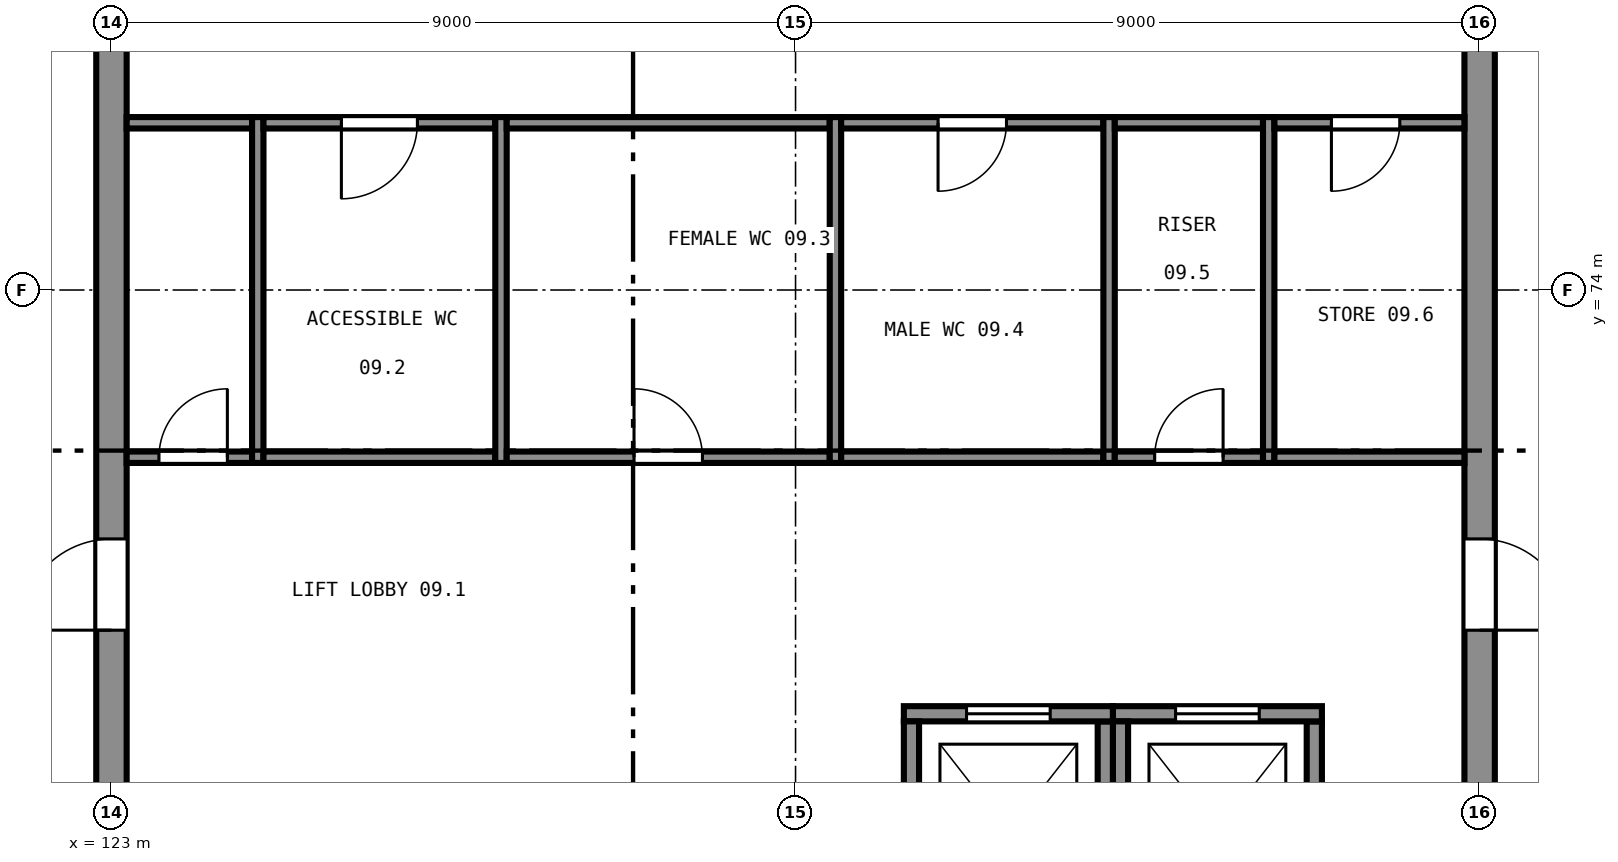
"""IFC4 building model, lengths in metres.
Left out: names, types, materials, properties, quantities, classifications, styles, units other than length and angle.
Written with IfcOpenShell. Run it as: python <this file> out.ifc"""

import sys

from ifc_helpers import new_model, si_unit, direction, frame, frame_2d, origin, place, context, subcontext, project, spatial, rectangle, extrude, element, fill, save


model = new_model("IFC4")
c1 = context("Model", 3, precision=1e-05, world=origin(), true_north=direction((0.0, 1.0)))
c2 = subcontext(c1, "Body", "Model", "MODEL_VIEW")
j1 = project(units=[si_unit("LENGTHUNIT", "METRE"), si_unit("PLANEANGLEUNIT", "RADIAN")], contexts=[c1])
p1 = place(None, origin())
s1 = spatial("IfcSite", under=j1, at=p1, CompositionType="ELEMENT")
p2 = place(p1, origin())
s2 = spatial("IfcBuilding", under=s1, at=p2, CompositionType="ELEMENT")
p3 = place(p2, frame((0.0, 0.0, 37.5)))
s3 = spatial("IfcBuildingStorey", under=s2, at=p3, CompositionType="ELEMENT", Elevation=37.5)
p4 = place(p3, frame((141.0, 65.2, 0.0), z_axis=(0.0, 0.0, 1.0), x_axis=(0.0, 1.0, 0.0)))
e1 = element("IfcWall", 1, at=p4, inside=s3, PredefinedType="SHEAR", context=c2, shape_type="SweptSolid", body=[
    extrude(rectangle(XDim=17.6, YDim=0.4, at=frame_2d((8.8, 0.0))), origin(), (0.0, 0.0, 1.0), 4.0),
])
p5 = place(p4, frame((4.325, 0.0, 0.0)))
e2 = element("IfcOpeningElement", 2, at=p5, cuts=e1, PredefinedType="OPENING", context=c2, shape_type="SweptSolid", body=[
    extrude(rectangle(XDim=1.2, YDim=2.1, at=frame_2d((0.6, 1.05))), frame((0.0, 0.21, 0.0), z_axis=(0.0, -1.0, 0.0), x_axis=(1.0, 0.0, 0.0)), (0.0, 0.0, 1.0), 0.42),
])
p6 = place(p4, frame((12.075, 0.0, 0.0)))
e3 = element("IfcOpeningElement", 3, at=p6, cuts=e1, PredefinedType="OPENING", context=c2, shape_type="SweptSolid", body=[
    extrude(rectangle(XDim=1.2, YDim=2.1, at=frame_2d((0.6, 1.05))), frame((0.0, 0.21, 0.0), z_axis=(0.0, -1.0, 0.0), x_axis=(1.0, 0.0, 0.0)), (0.0, 0.0, 1.0), 0.42),
])
p7 = place(p3, frame((123.0, 82.8, 0.0), z_axis=(0.0, 0.0, 1.0), x_axis=(0.0, -1.0, 0.0)))
e4 = element("IfcWall", 4, at=p7, inside=s3, PredefinedType="SHEAR", context=c2, shape_type="SweptSolid", body=[
    extrude(rectangle(XDim=17.6, YDim=0.4, at=frame_2d((8.8, 0.0))), origin(), (0.0, 0.0, 1.0), 4.0),
])
p8 = place(p7, frame((12.075, 0.0, 0.0)))
e5 = element("IfcOpeningElement", 5, at=p8, cuts=e4, PredefinedType="OPENING", context=c2, shape_type="SweptSolid", body=[
    extrude(rectangle(XDim=1.2, YDim=2.1, at=frame_2d((0.6, 1.05))), frame((0.0, 0.21, 0.0), z_axis=(0.0, -1.0, 0.0), x_axis=(1.0, 0.0, 0.0)), (0.0, 0.0, 1.0), 0.42),
])
p9 = place(p7, frame((4.325, 0.0, 0.0)))
e6 = element("IfcOpeningElement", 6, at=p9, cuts=e4, PredefinedType="OPENING", context=c2, shape_type="SweptSolid", body=[
    extrude(rectangle(XDim=1.2, YDim=2.1, at=frame_2d((0.6, 1.05))), frame((0.0, 0.21, 0.0), z_axis=(0.0, -1.0, 0.0), x_axis=(1.0, 0.0, 0.0)), (0.0, 0.0, 1.0), 0.42),
])
p10 = place(p3, frame((136.075, 65.425, 0.0), z_axis=(0.0, 0.0, 1.0), x_axis=(0.0, 1.0, 0.0)))
e7 = element("IfcWall", 7, at=p10, inside=s3, PredefinedType="SHEAR", context=c2, shape_type="SweptSolid", body=[
    extrude(rectangle(XDim=2.9, YDim=0.2, at=frame_2d((1.45, 0.0))), origin(), (0.0, 0.0, 1.0), 4.0),
])
p11 = place(p3, frame((136.175, 68.425, 0.0), z_axis=(0.0, 0.0, 1.0), x_axis=(-1.0, 0.0, 0.0)))
e8 = element("IfcWall", 8, at=p11, inside=s3, PredefinedType="SHEAR", context=c2, shape_type="SweptSolid", body=[
    extrude(rectangle(XDim=2.75, YDim=0.2, at=frame_2d((1.375, 0.0))), origin(), (0.0, 0.0, 1.0), 4.0),
])
p12 = place(p11, frame((0.825, 0.0, 0.0)))
e9 = element("IfcOpeningElement", 9, at=p12, cuts=e8, PredefinedType="OPENING", context=c2, shape_type="SweptSolid", body=[
    extrude(rectangle(XDim=1.1, YDim=2.1, at=frame_2d((0.55, 1.05))), frame((0.0, 0.11, 0.0), z_axis=(0.0, -1.0, 0.0), x_axis=(1.0, 0.0, 0.0)), (0.0, 0.0, 1.0), 0.22),
])
for number, where, z_axis, x_axis in (
    (10, (133.525, 68.325, 0.0), (0.0, 0.0, 1.0), (0.0, -1.0, 0.0)),
    (11, (138.825, 65.425, 0.0), (0.0, 0.0, 1.0), (0.0, 1.0, 0.0)),
):
    element("IfcWall", number, at=place(p3, frame(where, z_axis=z_axis, x_axis=x_axis)), inside=s3, PredefinedType="SHEAR", context=c2, shape_type="SweptSolid", body=[
        extrude(rectangle(XDim=2.9, YDim=0.2, at=frame_2d((1.45, 0.0))), origin(), (0.0, 0.0, 1.0), 4.0),
    ])
p13 = place(p3, frame((138.925, 68.425, 0.0), z_axis=(0.0, 0.0, 1.0), x_axis=(-1.0, 0.0, 0.0)))
e12 = element("IfcWall", 12, at=p13, inside=s3, PredefinedType="SHEAR", context=c2, shape_type="SweptSolid", body=[
    extrude(rectangle(XDim=2.75, YDim=0.2, at=frame_2d((1.375, 0.0))), origin(), (0.0, 0.0, 1.0), 4.0),
])
p14 = place(p13, frame((0.825, 0.0, 0.0)))
e13 = element("IfcOpeningElement", 13, at=p14, cuts=e12, PredefinedType="OPENING", context=c2, shape_type="SweptSolid", body=[
    extrude(rectangle(XDim=1.1, YDim=2.1, at=frame_2d((0.55, 1.05))), frame((0.0, 0.11, 0.0), z_axis=(0.0, -1.0, 0.0), x_axis=(1.0, 0.0, 0.0)), (0.0, 0.0, 1.0), 0.22),
])
p15 = place(p3, frame((136.275, 68.325, 0.0), z_axis=(0.0, 0.0, 1.0), x_axis=(0.0, -1.0, 0.0)))
e14 = element("IfcWall", 14, at=p15, inside=s3, PredefinedType="SHEAR", context=c2, shape_type="SweptSolid", body=[
    extrude(rectangle(XDim=2.9, YDim=0.2, at=frame_2d((1.45, 0.0))), origin(), (0.0, 0.0, 1.0), 4.0),
])
p16 = place(p3, frame((124.925, 71.725, 0.0), z_axis=(0.0, 0.0, 1.0), x_axis=(0.0, 1.0, 0.0)))
e15 = element("IfcWall", 15, at=p16, inside=s3, PredefinedType="PARTITIONING", context=c2, shape_type="SweptSolid", body=[
    extrude(rectangle(XDim=4.55, YDim=0.15, at=frame_2d((2.275, 0.0))), origin(), (0.0, 0.0, 1.0), 3.58),
])
p17 = place(p3, frame((123.2, 71.8, 0.0), z_axis=(0.0, 0.0, 1.0), x_axis=(1.0, 0.0, 0.0)))
e16 = element("IfcWall", 16, at=p17, inside=s3, PredefinedType="PARTITIONING", context=c2, shape_type="SweptSolid", body=[
    extrude(rectangle(XDim=1.65, YDim=0.15, at=frame_2d((0.825, 0.0))), origin(), (0.0, 0.0, 1.0), 3.58),
])
p18 = place(p17, frame((0.425, 0.0, 0.0)))
e17 = element("IfcOpeningElement", 17, at=p18, cuts=e16, PredefinedType="OPENING", context=c2, shape_type="SweptSolid", body=[
    extrude(rectangle(XDim=0.9, YDim=2.1, at=frame_2d((0.45, 1.05))), frame((0.0, 0.085, 0.0), z_axis=(0.0, -1.0, 0.0), x_axis=(1.0, 0.0, 0.0)), (0.0, 0.0, 1.0), 0.17),
])
p19 = place(p3, frame((123.2, 76.2, 0.0), z_axis=(0.0, 0.0, 1.0), x_axis=(1.0, 0.0, 0.0)))
e18 = element("IfcWall", 18, at=p19, inside=s3, PredefinedType="PARTITIONING", context=c2, shape_type="SweptSolid", body=[
    extrude(rectangle(XDim=1.65, YDim=0.15, at=frame_2d((0.825, 0.0))), origin(), (0.0, 0.0, 1.0), 3.58),
])
p20 = place(p3, frame((128.125, 71.725, 0.0), z_axis=(0.0, 0.0, 1.0), x_axis=(0.0, 1.0, 0.0)))
e19 = element("IfcWall", 19, at=p20, inside=s3, PredefinedType="PARTITIONING", context=c2, shape_type="SweptSolid", body=[
    extrude(rectangle(XDim=4.55, YDim=0.15, at=frame_2d((2.275, 0.0))), origin(), (0.0, 0.0, 1.0), 3.58),
])
p21 = place(p3, frame((125.0, 71.8, 0.0), z_axis=(0.0, 0.0, 1.0), x_axis=(1.0, 0.0, 0.0)))
e20 = element("IfcWall", 20, at=p21, inside=s3, PredefinedType="PARTITIONING", context=c2, shape_type="SweptSolid", body=[
    extrude(rectangle(XDim=3.05, YDim=0.15, at=frame_2d((1.525, 0.0))), origin(), (0.0, 0.0, 1.0), 3.58),
])
p22 = place(p3, frame((125.0, 76.2, 0.0), z_axis=(0.0, 0.0, 1.0), x_axis=(1.0, 0.0, 0.0)))
e21 = element("IfcWall", 21, at=p22, inside=s3, PredefinedType="PARTITIONING", context=c2, shape_type="SweptSolid", body=[
    extrude(rectangle(XDim=3.05, YDim=0.15, at=frame_2d((1.525, 0.0))), origin(), (0.0, 0.0, 1.0), 3.58),
])
p23 = place(p22, frame((1.025, 0.0, 0.0)))
e22 = element("IfcOpeningElement", 22, at=p23, cuts=e21, PredefinedType="OPENING", context=c2, shape_type="SweptSolid", body=[
    extrude(rectangle(XDim=1.0, YDim=2.1, at=frame_2d((0.5, 1.05))), frame((0.0, 0.085, 0.0), z_axis=(0.0, -1.0, 0.0), x_axis=(1.0, 0.0, 0.0)), (0.0, 0.0, 1.0), 0.17),
])
p24 = place(p3, frame((132.525, 71.725, 0.0), z_axis=(0.0, 0.0, 1.0), x_axis=(0.0, 1.0, 0.0)))
e23 = element("IfcWall", 23, at=p24, inside=s3, PredefinedType="PARTITIONING", context=c2, shape_type="SweptSolid", body=[
    extrude(rectangle(XDim=4.55, YDim=0.15, at=frame_2d((2.275, 0.0))), origin(), (0.0, 0.0, 1.0), 3.58),
])
p25 = place(p3, frame((128.2, 71.8, 0.0), z_axis=(0.0, 0.0, 1.0), x_axis=(1.0, 0.0, 0.0)))
e24 = element("IfcWall", 24, at=p25, inside=s3, PredefinedType="PARTITIONING", context=c2, shape_type="SweptSolid", body=[
    extrude(rectangle(XDim=4.25, YDim=0.15, at=frame_2d((2.125, 0.0))), origin(), (0.0, 0.0, 1.0), 3.58),
])
p26 = place(p25, frame((1.675, 0.0, 0.0)))
e25 = element("IfcOpeningElement", 25, at=p26, cuts=e24, PredefinedType="OPENING", context=c2, shape_type="SweptSolid", body=[
    extrude(rectangle(XDim=0.9, YDim=2.1, at=frame_2d((0.45, 1.05))), frame((0.0, 0.085, 0.0), z_axis=(0.0, -1.0, 0.0), x_axis=(1.0, 0.0, 0.0)), (0.0, 0.0, 1.0), 0.17),
])
p27 = place(p3, frame((128.2, 76.2, 0.0), z_axis=(0.0, 0.0, 1.0), x_axis=(1.0, 0.0, 0.0)))
e26 = element("IfcWall", 26, at=p27, inside=s3, PredefinedType="PARTITIONING", context=c2, shape_type="SweptSolid", body=[
    extrude(rectangle(XDim=4.25, YDim=0.15, at=frame_2d((2.125, 0.0))), origin(), (0.0, 0.0, 1.0), 3.58),
])
p28 = place(p3, frame((136.125, 71.725, 0.0), z_axis=(0.0, 0.0, 1.0), x_axis=(0.0, 1.0, 0.0)))
e27 = element("IfcWall", 27, at=p28, inside=s3, PredefinedType="PARTITIONING", context=c2, shape_type="SweptSolid", body=[
    extrude(rectangle(XDim=4.55, YDim=0.15, at=frame_2d((2.275, 0.0))), origin(), (0.0, 0.0, 1.0), 3.58),
])
p29 = place(p3, frame((132.6, 71.8, 0.0), z_axis=(0.0, 0.0, 1.0), x_axis=(1.0, 0.0, 0.0)))
e28 = element("IfcWall", 28, at=p29, inside=s3, PredefinedType="PARTITIONING", context=c2, shape_type="SweptSolid", body=[
    extrude(rectangle(XDim=3.45, YDim=0.15, at=frame_2d((1.725, 0.0))), origin(), (0.0, 0.0, 1.0), 3.58),
])
p30 = place(p3, frame((132.6, 76.2, 0.0), z_axis=(0.0, 0.0, 1.0), x_axis=(1.0, 0.0, 0.0)))
e29 = element("IfcWall", 29, at=p30, inside=s3, PredefinedType="PARTITIONING", context=c2, shape_type="SweptSolid", body=[
    extrude(rectangle(XDim=3.45, YDim=0.15, at=frame_2d((1.725, 0.0))), origin(), (0.0, 0.0, 1.0), 3.58),
])
p31 = place(p30, frame((1.275, 0.0, 0.0)))
e30 = element("IfcOpeningElement", 30, at=p31, cuts=e29, PredefinedType="OPENING", context=c2, shape_type="SweptSolid", body=[
    extrude(rectangle(XDim=0.9, YDim=2.1, at=frame_2d((0.45, 1.05))), frame((0.0, 0.085, 0.0), z_axis=(0.0, -1.0, 0.0), x_axis=(1.0, 0.0, 0.0)), (0.0, 0.0, 1.0), 0.17),
])
p32 = place(p3, frame((138.225, 71.725, 0.0), z_axis=(0.0, 0.0, 1.0), x_axis=(0.0, 1.0, 0.0)))
e31 = element("IfcWall", 31, at=p32, inside=s3, PredefinedType="PARTITIONING", context=c2, shape_type="SweptSolid", body=[
    extrude(rectangle(XDim=4.55, YDim=0.15, at=frame_2d((2.275, 0.0))), origin(), (0.0, 0.0, 1.0), 3.58),
])
p33 = place(p3, frame((136.2, 71.8, 0.0), z_axis=(0.0, 0.0, 1.0), x_axis=(1.0, 0.0, 0.0)))
e32 = element("IfcWall", 32, at=p33, inside=s3, PredefinedType="PARTITIONING", context=c2, shape_type="SweptSolid", body=[
    extrude(rectangle(XDim=1.95, YDim=0.15, at=frame_2d((0.975, 0.0))), origin(), (0.0, 0.0, 1.0), 3.58),
])
p34 = place(p33, frame((0.525, 0.0, 0.0)))
e33 = element("IfcOpeningElement", 33, at=p34, cuts=e32, PredefinedType="OPENING", context=c2, shape_type="SweptSolid", body=[
    extrude(rectangle(XDim=0.9, YDim=2.1, at=frame_2d((0.45, 1.05))), frame((0.0, 0.085, 0.0), z_axis=(0.0, -1.0, 0.0), x_axis=(1.0, 0.0, 0.0)), (0.0, 0.0, 1.0), 0.17),
])
p35 = place(p3, frame((136.2, 76.2, 0.0), z_axis=(0.0, 0.0, 1.0), x_axis=(1.0, 0.0, 0.0)))
e34 = element("IfcWall", 34, at=p35, inside=s3, PredefinedType="PARTITIONING", context=c2, shape_type="SweptSolid", body=[
    extrude(rectangle(XDim=1.95, YDim=0.15, at=frame_2d((0.975, 0.0))), origin(), (0.0, 0.0, 1.0), 3.58),
])
p36 = place(p3, frame((138.3, 71.8, 0.0), z_axis=(0.0, 0.0, 1.0), x_axis=(1.0, 0.0, 0.0)))
e35 = element("IfcWall", 35, at=p36, inside=s3, PredefinedType="PARTITIONING", context=c2, shape_type="SweptSolid", body=[
    extrude(rectangle(XDim=2.5, YDim=0.15, at=frame_2d((1.25, 0.0))), origin(), (0.0, 0.0, 1.0), 3.58),
])
p37 = place(p3, frame((138.3, 76.2, 0.0), z_axis=(0.0, 0.0, 1.0), x_axis=(1.0, 0.0, 0.0)))
e36 = element("IfcWall", 36, at=p37, inside=s3, PredefinedType="PARTITIONING", context=c2, shape_type="SweptSolid", body=[
    extrude(rectangle(XDim=2.5, YDim=0.15, at=frame_2d((1.25, 0.0))), origin(), (0.0, 0.0, 1.0), 3.58),
])
p38 = place(p37, frame((0.75, 0.0, 0.0)))
e37 = element("IfcOpeningElement", 37, at=p38, cuts=e36, PredefinedType="OPENING", context=c2, shape_type="SweptSolid", body=[
    extrude(rectangle(XDim=0.9, YDim=2.1, at=frame_2d((0.45, 1.05))), frame((0.0, 0.085, 0.0), z_axis=(0.0, -1.0, 0.0), x_axis=(1.0, 0.0, 0.0)), (0.0, 0.0, 1.0), 0.17),
])
p39 = place(p12, origin())
e38 = element("IfcDoor", 38, at=p39, inside=s3, OperationType="SLIDING_TO_LEFT", PredefinedType="DOOR", context=c2, shape_type="SweptSolid", body=[
    extrude(rectangle(XDim=1.1, YDim=2.1, at=frame_2d((0.55, 1.05))), frame((0.0, 0.025, 0.0), z_axis=(0.0, -1.0, 0.0), x_axis=(1.0, 0.0, 0.0)), (0.0, 0.0, 1.0), 0.05),
])
fill(e9, e38)
p40 = place(p14, origin())
e39 = element("IfcDoor", 39, at=p40, inside=s3, OperationType="SLIDING_TO_LEFT", PredefinedType="DOOR", context=c2, shape_type="SweptSolid", body=[
    extrude(rectangle(XDim=1.1, YDim=2.1, at=frame_2d((0.55, 1.05))), frame((0.0, 0.025, 0.0), z_axis=(0.0, -1.0, 0.0), x_axis=(1.0, 0.0, 0.0)), (0.0, 0.0, 1.0), 0.05),
])
fill(e13, e39)
p41 = place(p8, frame((1.2, 0.0, 0.0), z_axis=(0.0, 0.0, 1.0), x_axis=(-1.0, 0.0, 0.0)))
e40 = element("IfcDoor", 40, at=p41, inside=s3, OperationType="SINGLE_SWING_RIGHT", PredefinedType="DOOR", context=c2, shape_type="SweptSolid", body=[
    extrude(rectangle(XDim=1.2, YDim=2.1, at=frame_2d((0.6, 1.05))), frame((0.0, 0.025, 0.0), z_axis=(0.0, -1.0, 0.0), x_axis=(1.0, 0.0, 0.0)), (0.0, 0.0, 1.0), 0.05),
])
fill(e5, e40)
p42 = place(p5, frame((1.2, 0.0, 0.0), z_axis=(0.0, 0.0, 1.0), x_axis=(-1.0, 0.0, 0.0)))
e41 = element("IfcDoor", 41, at=p42, inside=s3, OperationType="SINGLE_SWING_LEFT", PredefinedType="DOOR", context=c2, shape_type="SweptSolid", body=[
    extrude(rectangle(XDim=1.2, YDim=2.1, at=frame_2d((0.6, 1.05))), frame((0.0, 0.025, 0.0), z_axis=(0.0, -1.0, 0.0), x_axis=(1.0, 0.0, 0.0)), (0.0, 0.0, 1.0), 0.05),
])
fill(e2, e41)
p43 = place(p18, origin())
e42 = element("IfcDoor", 42, at=p43, inside=s3, OperationType="SINGLE_SWING_LEFT", PredefinedType="DOOR", context=c2, shape_type="SweptSolid", body=[
    extrude(rectangle(XDim=0.9, YDim=2.1, at=frame_2d((0.45, 1.05))), frame((0.0, 0.025, 0.0), z_axis=(0.0, -1.0, 0.0), x_axis=(1.0, 0.0, 0.0)), (0.0, 0.0, 1.0), 0.05),
])
fill(e17, e42)
p44 = place(p23, frame((1.0, 0.0, 0.0), z_axis=(0.0, 0.0, 1.0), x_axis=(-1.0, 0.0, 0.0)))
e43 = element("IfcDoor", 43, at=p44, inside=s3, OperationType="SINGLE_SWING_LEFT", PredefinedType="DOOR", context=c2, shape_type="SweptSolid", body=[
    extrude(rectangle(XDim=1.0, YDim=2.1, at=frame_2d((0.5, 1.05))), frame((0.0, 0.025, 0.0), z_axis=(0.0, -1.0, 0.0), x_axis=(1.0, 0.0, 0.0)), (0.0, 0.0, 1.0), 0.05),
])
fill(e22, e43)
p45 = place(p26, origin())
e44 = element("IfcDoor", 44, at=p45, inside=s3, OperationType="SINGLE_SWING_RIGHT", PredefinedType="DOOR", context=c2, shape_type="SweptSolid", body=[
    extrude(rectangle(XDim=0.9, YDim=2.1, at=frame_2d((0.45, 1.05))), frame((0.0, 0.025, 0.0), z_axis=(0.0, -1.0, 0.0), x_axis=(1.0, 0.0, 0.0)), (0.0, 0.0, 1.0), 0.05),
])
fill(e25, e44)
p46 = place(p31, frame((0.9, 0.0, 0.0), z_axis=(0.0, 0.0, 1.0), x_axis=(-1.0, 0.0, 0.0)))
e45 = element("IfcDoor", 45, at=p46, inside=s3, OperationType="SINGLE_SWING_LEFT", PredefinedType="DOOR", context=c2, shape_type="SweptSolid", body=[
    extrude(rectangle(XDim=0.9, YDim=2.1, at=frame_2d((0.45, 1.05))), frame((0.0, 0.025, 0.0), z_axis=(0.0, -1.0, 0.0), x_axis=(1.0, 0.0, 0.0)), (0.0, 0.0, 1.0), 0.05),
])
fill(e30, e45)
p47 = place(p34, origin())
e46 = element("IfcDoor", 46, at=p47, inside=s3, OperationType="SINGLE_SWING_LEFT", PredefinedType="DOOR", context=c2, shape_type="SweptSolid", body=[
    extrude(rectangle(XDim=0.9, YDim=2.1, at=frame_2d((0.45, 1.05))), frame((0.0, 0.025, 0.0), z_axis=(0.0, -1.0, 0.0), x_axis=(1.0, 0.0, 0.0)), (0.0, 0.0, 1.0), 0.05),
])
fill(e33, e46)
p48 = place(p38, frame((0.9, 0.0, 0.0), z_axis=(0.0, 0.0, 1.0), x_axis=(-1.0, 0.0, 0.0)))
e47 = element("IfcDoor", 47, at=p48, inside=s3, OperationType="SINGLE_SWING_LEFT", PredefinedType="DOOR", context=c2, shape_type="SweptSolid", body=[
    extrude(rectangle(XDim=0.9, YDim=2.1, at=frame_2d((0.45, 1.05))), frame((0.0, 0.025, 0.0), z_axis=(0.0, -1.0, 0.0), x_axis=(1.0, 0.0, 0.0)), (0.0, 0.0, 1.0), 0.05),
])
fill(e37, e47)
save(model, sys.argv[1])
